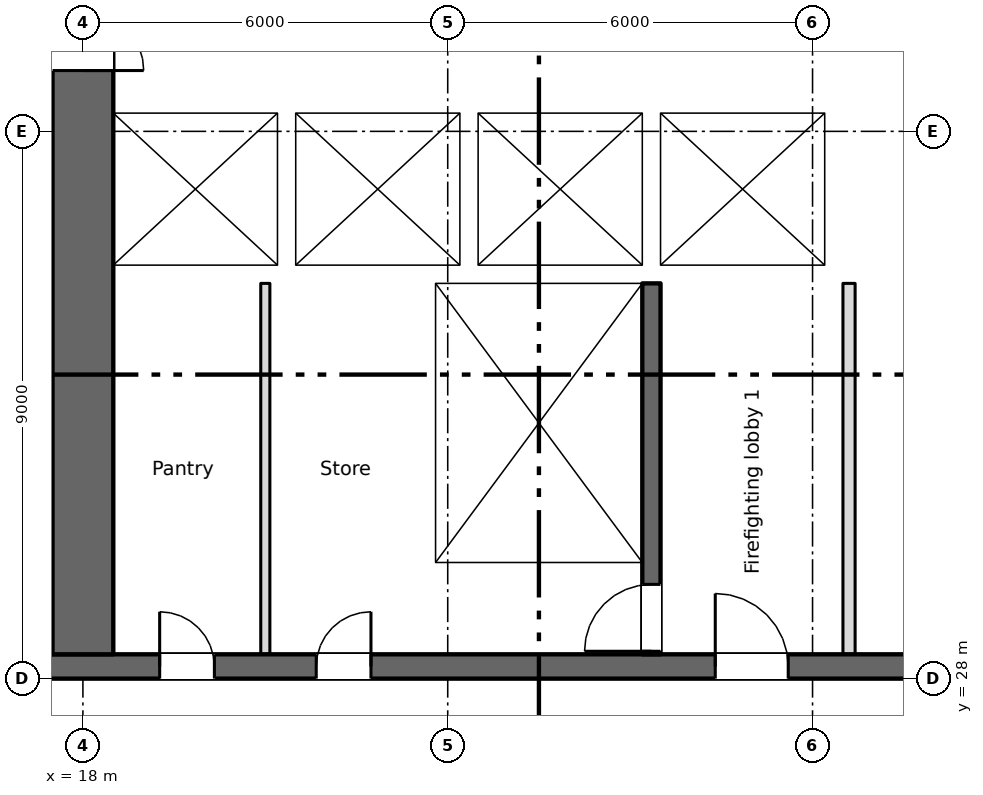
"""IFC4 building model, lengths in metres.
Left out: names, types, materials, properties, quantities, classifications, styles, units other than length and angle.
Written with IfcOpenShell. Run it as: python <this file> out.ifc"""

import sys

from ifc_helpers import new_model, si_unit, direction, frame, frame_2d, origin, place, context, subcontext, project, spatial, rectangle, extrude, element, fill, save


model = new_model("IFC4")
c1 = context("Model", 3, precision=1e-05, world=origin(), true_north=direction((0.0, 1.0)))
c2 = subcontext(c1, "Body", "Model", "MODEL_VIEW")
j1 = project(units=[si_unit("LENGTHUNIT", "METRE"), si_unit("PLANEANGLEUNIT", "RADIAN")], contexts=[c1])
p1 = place(None, origin())
s1 = spatial("IfcSite", under=j1, at=p1, CompositionType="ELEMENT")
p2 = place(p1, origin())
s2 = spatial("IfcBuilding", under=s1, at=p2, CompositionType="ELEMENT")
p3 = place(p2, frame((0.0, 0.0, 71.25)))
s3 = spatial("IfcBuildingStorey", under=s2, at=p3, CompositionType="ELEMENT", Elevation=71.25)
p4 = place(p3, frame((6.7, 28.2, 0.0), z_axis=(0.0, 0.0, 1.0), x_axis=(1.0, 0.0, 0.0)))
e1 = element("IfcWall", 1, at=p4, inside=s3, PredefinedType="SHEAR", context=c2, shape_type="SweptSolid", body=[
    extrude(rectangle(XDim=57.8, YDim=0.4, at=frame_2d((28.9, 0.0))), origin(), (0.0, 0.0, 1.0), 3.35),
])
p5 = place(p4, frame((12.562, 0.0, 0.0)))
e2 = element("IfcOpeningElement", 2, at=p5, cuts=e1, PredefinedType="OPENING", context=c2, shape_type="SweptSolid", body=[
    extrude(rectangle(XDim=0.9, YDim=2.1, at=frame_2d((0.45, 1.05))), frame((0.0, 0.21, 0.0), z_axis=(0.0, -1.0, 0.0), x_axis=(1.0, 0.0, 0.0)), (0.0, 0.0, 1.0), 0.42),
])
p6 = place(p4, frame((15.137, 0.0, 0.0)))
e3 = element("IfcOpeningElement", 3, at=p6, cuts=e1, PredefinedType="OPENING", context=c2, shape_type="SweptSolid", body=[
    extrude(rectangle(XDim=0.9, YDim=2.1, at=frame_2d((0.45, 1.05))), frame((0.0, 0.21, 0.0), z_axis=(0.0, -1.0, 0.0), x_axis=(1.0, 0.0, 0.0)), (0.0, 0.0, 1.0), 0.42),
])
p7 = place(p4, frame((49.85, 0.0, 0.0)))
e4 = element("IfcOpeningElement", 4, at=p7, cuts=e1, PredefinedType="OPENING", context=c2, shape_type="SweptSolid", body=[
    extrude(rectangle(XDim=0.9, YDim=2.1, at=frame_2d((0.45, 1.05))), frame((0.0, 0.21, 0.0), z_axis=(0.0, -1.0, 0.0), x_axis=(1.0, 0.0, 0.0)), (0.0, 0.0, 1.0), 0.42),
])
p8 = place(p4, frame((0.562, 0.0, 0.0)))
e5 = element("IfcOpeningElement", 5, at=p8, cuts=e1, PredefinedType="OPENING", context=c2, shape_type="SweptSolid", body=[
    extrude(rectangle(XDim=0.9, YDim=2.1, at=frame_2d((0.45, 1.05))), frame((0.0, 0.21, 0.0), z_axis=(0.0, -1.0, 0.0), x_axis=(1.0, 0.0, 0.0)), (0.0, 0.0, 1.0), 0.42),
])
p9 = place(p4, frame((2.137, 0.0, 0.0)))
e6 = element("IfcOpeningElement", 6, at=p9, cuts=e1, PredefinedType="OPENING", context=c2, shape_type="SweptSolid", body=[
    extrude(rectangle(XDim=0.9, YDim=2.1, at=frame_2d((0.45, 1.05))), frame((0.0, 0.21, 0.0), z_axis=(0.0, -1.0, 0.0), x_axis=(1.0, 0.0, 0.0)), (0.0, 0.0, 1.0), 0.42),
])
p10 = place(p4, frame((4.7, 0.0, 0.0)))
e7 = element("IfcOpeningElement", 7, at=p10, cuts=e1, PredefinedType="OPENING", context=c2, shape_type="SweptSolid", body=[
    extrude(rectangle(XDim=1.2, YDim=2.1, at=frame_2d((0.6, 1.05))), frame((0.0, 0.21, 0.0), z_axis=(0.0, -1.0, 0.0), x_axis=(1.0, 0.0, 0.0)), (0.0, 0.0, 1.0), 0.42),
])
p11 = place(p4, frame((31.7, 0.0, 0.0)))
e8 = element("IfcOpeningElement", 8, at=p11, cuts=e1, PredefinedType="OPENING", context=c2, shape_type="SweptSolid", body=[
    extrude(rectangle(XDim=1.2, YDim=2.1, at=frame_2d((0.6, 1.05))), frame((0.0, 0.21, 0.0), z_axis=(0.0, -1.0, 0.0), x_axis=(1.0, 0.0, 0.0)), (0.0, 0.0, 1.0), 0.42),
])
p12 = place(p4, frame((55.2, 0.0, 0.0)))
e9 = element("IfcOpeningElement", 9, at=p12, cuts=e1, PredefinedType="OPENING", context=c2, shape_type="SweptSolid", body=[
    extrude(rectangle(XDim=1.2, YDim=2.1, at=frame_2d((0.6, 1.05))), frame((0.0, 0.21, 0.0), z_axis=(0.0, -1.0, 0.0), x_axis=(1.0, 0.0, 0.0)), (0.0, 0.0, 1.0), 0.42),
])
p13 = place(p4, frame((21.7, 0.0, 0.0)))
e10 = element("IfcOpeningElement", 10, at=p13, cuts=e1, PredefinedType="OPENING", context=c2, shape_type="SweptSolid", body=[
    extrude(rectangle(XDim=1.2, YDim=2.1, at=frame_2d((0.6, 1.05))), frame((0.0, 0.21, 0.0), z_axis=(0.0, -1.0, 0.0), x_axis=(1.0, 0.0, 0.0)), (0.0, 0.0, 1.0), 0.42),
])
p14 = place(p4, frame((41.7, 0.0, 0.0)))
e11 = element("IfcOpeningElement", 11, at=p14, cuts=e1, PredefinedType="OPENING", context=c2, shape_type="SweptSolid", body=[
    extrude(rectangle(XDim=1.2, YDim=2.1, at=frame_2d((0.6, 1.05))), frame((0.0, 0.21, 0.0), z_axis=(0.0, -1.0, 0.0), x_axis=(1.0, 0.0, 0.0)), (0.0, 0.0, 1.0), 0.42),
])
p15 = place(p4, frame((24.85, 0.0, 0.0)))
e12 = element("IfcOpeningElement", 12, at=p15, cuts=e1, PredefinedType="OPENING", context=c2, shape_type="SweptSolid", body=[
    extrude(rectangle(XDim=2.4, YDim=2.1, at=frame_2d((1.2, 1.05))), frame((0.0, 0.21, 0.0), z_axis=(0.0, -1.0, 0.0), x_axis=(1.0, 0.0, 0.0)), (0.0, 0.0, 1.0), 0.42),
])
p16 = place(p4, frame((37.35, 0.0, 0.0)))
e13 = element("IfcOpeningElement", 13, at=p16, cuts=e1, PredefinedType="OPENING", context=c2, shape_type="SweptSolid", body=[
    extrude(rectangle(XDim=2.4, YDim=2.1, at=frame_2d((1.2, 1.05))), frame((0.0, 0.21, 0.0), z_axis=(0.0, -1.0, 0.0), x_axis=(1.0, 0.0, 0.0)), (0.0, 0.0, 1.0), 0.42),
])
p17 = place(p4, frame((7.85, 0.0, 0.0)))
e14 = element("IfcOpeningElement", 14, at=p17, cuts=e1, PredefinedType="OPENING", context=c2, shape_type="SweptSolid", body=[
    extrude(rectangle(XDim=2.4, YDim=2.1, at=frame_2d((1.2, 1.05))), frame((0.0, 0.21, 0.0), z_axis=(0.0, -1.0, 0.0), x_axis=(1.0, 0.0, 0.0)), (0.0, 0.0, 1.0), 0.42),
])
p18 = place(p4, frame((28.85, 0.0, 0.0)))
e15 = element("IfcOpeningElement", 15, at=p18, cuts=e1, PredefinedType="OPENING", context=c2, shape_type="SweptSolid", body=[
    extrude(rectangle(XDim=0.9, YDim=2.1, at=frame_2d((0.45, 1.05))), frame((0.0, 0.21, 0.0), z_axis=(0.0, -1.0, 0.0), x_axis=(1.0, 0.0, 0.0)), (0.0, 0.0, 1.0), 0.42),
])
p19 = place(p4, frame((34.85, 0.0, 0.0)))
e16 = element("IfcOpeningElement", 16, at=p19, cuts=e1, PredefinedType="OPENING", context=c2, shape_type="SweptSolid", body=[
    extrude(rectangle(XDim=0.9, YDim=2.1, at=frame_2d((0.45, 1.05))), frame((0.0, 0.21, 0.0), z_axis=(0.0, -1.0, 0.0), x_axis=(1.0, 0.0, 0.0)), (0.0, 0.0, 1.0), 0.42),
])
p20 = place(p3, frame((18.0, 28.4, 0.0), z_axis=(0.0, 0.0, 1.0), x_axis=(0.0, 1.0, 0.0)))
e17 = element("IfcWall", 17, at=p20, inside=s3, PredefinedType="SHEAR", context=c2, shape_type="SweptSolid", body=[
    extrude(rectangle(XDim=16.6, YDim=1.0, at=frame_2d((8.3, 0.0))), origin(), (0.0, 0.0, 1.0), 3.35),
])
p21 = place(p20, frame((9.6, 0.0, 0.0)))
e18 = element("IfcOpeningElement", 18, at=p21, cuts=e17, PredefinedType="OPENING", context=c2, shape_type="SweptSolid", body=[
    extrude(rectangle(XDim=2.0, YDim=2.1, at=frame_2d((1.0, 1.05))), frame((0.0, 0.51, 0.0), z_axis=(0.0, -1.0, 0.0), x_axis=(1.0, 0.0, 0.0)), (0.0, 0.0, 1.0), 1.02),
])
p22 = place(p20, frame((15.25, 0.0, 0.0)))
e19 = element("IfcOpeningElement", 19, at=p22, cuts=e17, PredefinedType="OPENING", context=c2, shape_type="SweptSolid", body=[
    extrude(rectangle(XDim=1.2, YDim=2.1, at=frame_2d((0.6, 1.05))), frame((0.0, 0.51, 0.0), z_axis=(0.0, -1.0, 0.0), x_axis=(1.0, 0.0, 0.0)), (0.0, 0.0, 1.0), 1.02),
])
p23 = place(p3, frame((23.65, 28.4, 0.0), z_axis=(0.0, 0.0, 1.0), x_axis=(0.0, 1.0, 0.0)))
e20 = element("IfcWall", 20, at=p23, inside=s3, PredefinedType="SHEAR", context=c2, shape_type="SweptSolid", body=[
    extrude(rectangle(XDim=6.1, YDim=0.3, at=frame_2d((3.05, 0.0))), origin(), (0.0, 0.0, 1.0), 3.35),
])
p24 = place(p3, frame((27.35, 28.4, 0.0), z_axis=(0.0, 0.0, 1.0), x_axis=(0.0, 1.0, 0.0)))
e21 = element("IfcWall", 21, at=p24, inside=s3, PredefinedType="SHEAR", context=c2, shape_type="SweptSolid", body=[
    extrude(rectangle(XDim=6.1, YDim=0.3, at=frame_2d((3.05, 0.0))), origin(), (0.0, 0.0, 1.0), 3.35),
])
p25 = place(p24, frame((0.05, 0.0, 0.0)))
e22 = element("IfcOpeningElement", 22, at=p25, cuts=e21, PredefinedType="OPENING", context=c2, shape_type="SweptSolid", body=[
    extrude(rectangle(XDim=1.1, YDim=2.1, at=frame_2d((0.55, 1.05))), frame((0.0, 0.16, 0.0), z_axis=(0.0, -1.0, 0.0), x_axis=(1.0, 0.0, 0.0)), (0.0, 0.0, 1.0), 0.32),
])
p26 = place(p3, frame((18.5, 34.65, 0.0), z_axis=(0.0, 0.0, 1.0), x_axis=(1.0, 0.0, 0.0)))
e23 = element("IfcWall", 23, at=p26, inside=s3, PredefinedType="SHEAR", context=c2, shape_type="SweptSolid", body=[
    extrude(rectangle(XDim=12.2, YDim=0.3, at=frame_2d((6.1, 0.0))), origin(), (0.0, 0.0, 1.0), 3.35),
])
p27 = place(p26, frame((9.8, 0.0, 0.0)))
e24 = element("IfcOpeningElement", 24, at=p27, cuts=e23, PredefinedType="OPENING", context=c2, shape_type="SweptSolid", body=[
    extrude(rectangle(XDim=1.1, YDim=2.1, at=frame_2d((0.55, 1.05))), frame((0.0, 0.16, 0.0), z_axis=(0.0, -1.0, 0.0), x_axis=(1.0, 0.0, 0.0)), (0.0, 0.0, 1.0), 0.32),
])
p28 = place(p3, frame((18.5, 37.45, 0.0), z_axis=(0.0, 0.0, 1.0), x_axis=(1.0, 0.0, 0.0)))
e25 = element("IfcWall", 25, at=p28, inside=s3, PredefinedType="SHEAR", context=c2, shape_type="SweptSolid", body=[
    extrude(rectangle(XDim=12.2, YDim=0.3, at=frame_2d((6.1, 0.0))), origin(), (0.0, 0.0, 1.0), 3.35),
])
p29 = place(p28, frame((0.8, 0.0, 0.0)))
e26 = element("IfcOpeningElement", 26, at=p29, cuts=e25, PredefinedType="OPENING", context=c2, shape_type="SweptSolid", body=[
    extrude(rectangle(XDim=1.1, YDim=2.1, at=frame_2d((0.55, 1.05))), frame((0.0, 0.16, 0.0), z_axis=(0.0, -1.0, 0.0), x_axis=(1.0, 0.0, 0.0)), (0.0, 0.0, 1.0), 0.32),
])
p30 = place(p28, frame((3.8, 0.0, 0.0)))
e27 = element("IfcOpeningElement", 27, at=p30, cuts=e25, PredefinedType="OPENING", context=c2, shape_type="SweptSolid", body=[
    extrude(rectangle(XDim=1.1, YDim=2.1, at=frame_2d((0.55, 1.05))), frame((0.0, 0.16, 0.0), z_axis=(0.0, -1.0, 0.0), x_axis=(1.0, 0.0, 0.0)), (0.0, 0.0, 1.0), 0.32),
])
p31 = place(p28, frame((6.8, 0.0, 0.0)))
e28 = element("IfcOpeningElement", 28, at=p31, cuts=e25, PredefinedType="OPENING", context=c2, shape_type="SweptSolid", body=[
    extrude(rectangle(XDim=1.1, YDim=2.1, at=frame_2d((0.55, 1.05))), frame((0.0, 0.16, 0.0), z_axis=(0.0, -1.0, 0.0), x_axis=(1.0, 0.0, 0.0)), (0.0, 0.0, 1.0), 0.32),
])
p32 = place(p3, frame((27.35, 34.8, 0.0), z_axis=(0.0, 0.0, 1.0), x_axis=(0.0, 1.0, 0.0)))
e29 = element("IfcWall", 29, at=p32, inside=s3, PredefinedType="SHEAR", context=c2, shape_type="SweptSolid", body=[
    extrude(rectangle(XDim=2.5, YDim=0.3, at=frame_2d((1.25, 0.0))), origin(), (0.0, 0.0, 1.0), 3.35),
])
p33 = place(p3, frame((30.45, 34.8, 0.0), z_axis=(0.0, 0.0, 1.0), x_axis=(0.0, 1.0, 0.0)))
e30 = element("IfcWall", 30, at=p33, inside=s3, PredefinedType="SHEAR", context=c2, shape_type="SweptSolid", body=[
    extrude(rectangle(XDim=2.5, YDim=0.5, at=frame_2d((1.25, 0.0))), origin(), (0.0, 0.0, 1.0), 3.35),
])
for number, where, z_axis, x_axis in (
    (31, (21.35, 34.8, 0.0), (0.0, 0.0, 1.0), (0.0, 1.0, 0.0)),
    (32, (24.35, 34.8, 0.0), (0.0, 0.0, 1.0), (0.0, 1.0, 0.0)),
):
    element("IfcWall", number, at=place(p3, frame(where, z_axis=z_axis, x_axis=x_axis)), inside=s3, PredefinedType="SHEAR", context=c2, shape_type="SweptSolid", body=[
        extrude(rectangle(XDim=2.5, YDim=0.3, at=frame_2d((1.25, 0.0))), origin(), (0.0, 0.0, 1.0), 3.35),
    ])
p34 = place(p3, frame((30.6, 28.4, 0.0), z_axis=(0.0, 0.0, 1.0), x_axis=(0.0, 1.0, 0.0)))
e33 = element("IfcWall", 33, at=p34, inside=s3, PredefinedType="PARTITIONING", context=c2, shape_type="SweptSolid", body=[
    extrude(rectangle(XDim=6.1, YDim=0.2, at=frame_2d((3.05, 0.0))), origin(), (0.0, 0.0, 1.0), 3.35),
])
p35 = place(p3, frame((21.0, 28.4, 0.0), z_axis=(0.0, 0.0, 1.0), x_axis=(0.0, 1.0, 0.0)))
e34 = element("IfcWall", 34, at=p35, inside=s3, PredefinedType="PARTITIONING", context=c2, shape_type="SweptSolid", body=[
    extrude(rectangle(XDim=6.1, YDim=0.15, at=frame_2d((3.05, 0.0))), origin(), (0.0, 0.0, 1.0), 3.35),
])
p36 = place(p5, origin())
e35 = element("IfcDoor", 35, at=p36, inside=s3, OperationType="SINGLE_SWING_LEFT", PredefinedType="DOOR", context=c2, shape_type="SweptSolid", body=[
    extrude(rectangle(XDim=0.9, YDim=2.1, at=frame_2d((0.45, 1.05))), frame((0.0, 0.025, 0.0), z_axis=(0.0, -1.0, 0.0), x_axis=(1.0, 0.0, 0.0)), (0.0, 0.0, 1.0), 0.05),
])
fill(e2, e35)
p37 = place(p6, origin())
e36 = element("IfcDoor", 36, at=p37, inside=s3, OperationType="SINGLE_SWING_RIGHT", PredefinedType="DOOR", context=c2, shape_type="SweptSolid", body=[
    extrude(rectangle(XDim=0.9, YDim=2.1, at=frame_2d((0.45, 1.05))), frame((0.0, 0.025, 0.0), z_axis=(0.0, -1.0, 0.0), x_axis=(1.0, 0.0, 0.0)), (0.0, 0.0, 1.0), 0.05),
])
fill(e3, e36)
p38 = place(p29, origin())
e37 = element("IfcDoor", 37, at=p38, inside=s3, OperationType="SLIDING_TO_LEFT", PredefinedType="DOOR", context=c2, shape_type="SweptSolid", body=[
    extrude(rectangle(XDim=1.1, YDim=2.1, at=frame_2d((0.55, 1.05))), frame((0.0, 0.025, 0.0), z_axis=(0.0, -1.0, 0.0), x_axis=(1.0, 0.0, 0.0)), (0.0, 0.0, 1.0), 0.05),
])
fill(e26, e37)
p39 = place(p30, origin())
e38 = element("IfcDoor", 38, at=p39, inside=s3, OperationType="SLIDING_TO_LEFT", PredefinedType="DOOR", context=c2, shape_type="SweptSolid", body=[
    extrude(rectangle(XDim=1.1, YDim=2.1, at=frame_2d((0.55, 1.05))), frame((0.0, 0.025, 0.0), z_axis=(0.0, -1.0, 0.0), x_axis=(1.0, 0.0, 0.0)), (0.0, 0.0, 1.0), 0.05),
])
fill(e27, e38)
p40 = place(p31, origin())
e39 = element("IfcDoor", 39, at=p40, inside=s3, OperationType="SLIDING_TO_LEFT", PredefinedType="DOOR", context=c2, shape_type="SweptSolid", body=[
    extrude(rectangle(XDim=1.1, YDim=2.1, at=frame_2d((0.55, 1.05))), frame((0.0, 0.025, 0.0), z_axis=(0.0, -1.0, 0.0), x_axis=(1.0, 0.0, 0.0)), (0.0, 0.0, 1.0), 0.05),
])
fill(e28, e39)
p41 = place(p27, origin())
e40 = element("IfcDoor", 40, at=p41, inside=s3, OperationType="SLIDING_TO_LEFT", PredefinedType="DOOR", context=c2, shape_type="SweptSolid", body=[
    extrude(rectangle(XDim=1.1, YDim=2.1, at=frame_2d((0.55, 1.05))), frame((0.0, 0.025, 0.0), z_axis=(0.0, -1.0, 0.0), x_axis=(1.0, 0.0, 0.0)), (0.0, 0.0, 1.0), 0.05),
])
fill(e24, e40)
p42 = place(p25, origin())
e41 = element("IfcDoor", 41, at=p42, inside=s3, OperationType="SINGLE_SWING_LEFT", PredefinedType="DOOR", context=c2, shape_type="SweptSolid", body=[
    extrude(rectangle(XDim=1.1, YDim=2.1, at=frame_2d((0.55, 1.05))), frame((0.0, 0.025, 0.0), z_axis=(0.0, -1.0, 0.0), x_axis=(1.0, 0.0, 0.0)), (0.0, 0.0, 1.0), 0.05),
])
fill(e22, e41)
p43 = place(p13, origin())
e42 = element("IfcDoor", 42, at=p43, inside=s3, OperationType="SINGLE_SWING_LEFT", PredefinedType="DOOR", context=c2, shape_type="SweptSolid", body=[
    extrude(rectangle(XDim=1.2, YDim=2.1, at=frame_2d((0.6, 1.05))), frame((0.0, 0.025, 0.0), z_axis=(0.0, -1.0, 0.0), x_axis=(1.0, 0.0, 0.0)), (0.0, 0.0, 1.0), 0.05),
])
fill(e10, e42)
p44 = place(p21, origin())
e43 = element("IfcDoor", 43, at=p44, inside=s3, OperationType="DOUBLE_DOOR_SINGLE_SWING", PredefinedType="DOOR", context=c2, shape_type="SweptSolid", body=[
    extrude(rectangle(XDim=2.0, YDim=2.1, at=frame_2d((1.0, 1.05))), frame((0.0, 0.025, 0.0), z_axis=(0.0, -1.0, 0.0), x_axis=(1.0, 0.0, 0.0)), (0.0, 0.0, 1.0), 0.05),
])
fill(e18, e43)
save(model, sys.argv[1])
